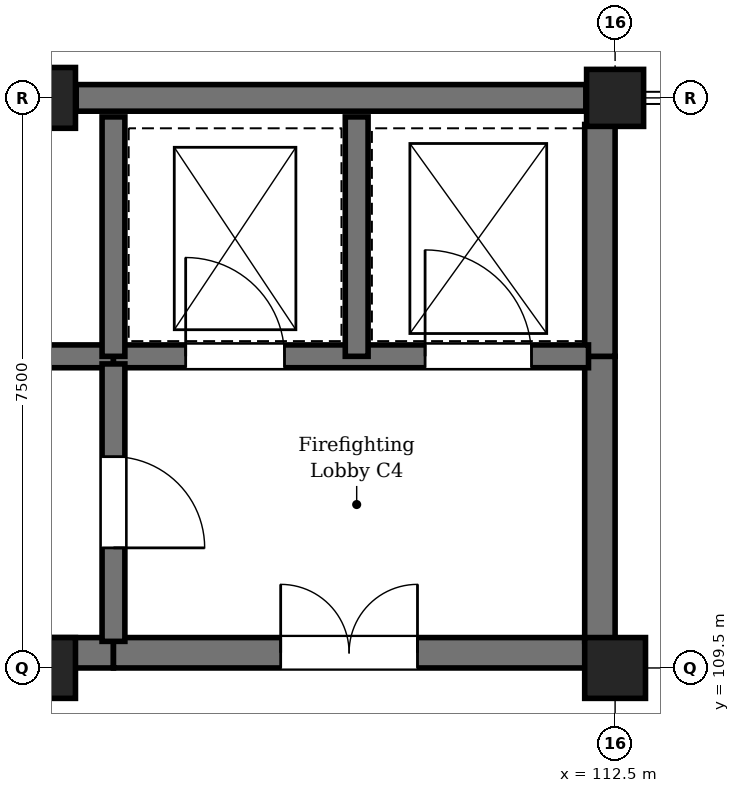
"""IFC4 building model, lengths in metres.
Left out: names, types, materials, properties, quantities, classifications, styles, units other than length and angle.
Written with IfcOpenShell. Run it as: python <this file> out.ifc"""

import sys

from ifc_helpers import new_model, si_unit, direction, frame, frame_2d, origin, origin_2d, place, context, subcontext, project, spatial, rectangle, circle, extrude, element, fill, save


model = new_model("IFC4")
c1 = context("Model", 3, precision=1e-05, world=origin(), true_north=direction((0.0, 1.0)))
c2 = subcontext(c1, "Body", "Model", "MODEL_VIEW")
j1 = project(units=[si_unit("LENGTHUNIT", "METRE"), si_unit("PLANEANGLEUNIT", "RADIAN")], contexts=[c1])
p1 = place(None, origin())
s1 = spatial("IfcSite", under=j1, at=p1, CompositionType="ELEMENT")
p2 = place(p1, origin())
s2 = spatial("IfcBuilding", under=s1, at=p2, CompositionType="ELEMENT")
p3 = place(p2, origin())
s3 = spatial("IfcBuildingStorey", under=s2, at=p3, CompositionType="ELEMENT", Elevation=0.0)
for number, where, z_axis, x_axis in (
    (1, (105.0, 109.5, 0.0), (0.0, 0.0, 1.0), (1.0, 0.0, 0.0)),
    (2, (105.0, 117.0, 0.0), (0.0, 0.0, 1.0), (1.0, 0.0, 0.0)),
    (3, (112.5, 109.5, 0.0), (0.0, 0.0, 1.0), (1.0, 0.0, 0.0)),
):
    element("IfcColumn", number, at=place(p3, frame(where, z_axis=z_axis, x_axis=x_axis)), inside=s3, PredefinedType="COLUMN", context=c2, shape_type="SweptSolid", body=[
        extrude(rectangle(XDim=0.8, YDim=0.8, at=origin_2d()), origin(), (0.0, 0.0, 1.0), 4.8),
    ])
p4 = place(p3, frame((112.5, 117.0, 0.0), z_axis=(0.0, 0.0, 1.0), x_axis=(1.0, 0.0, 0.0)))
e4 = element("IfcColumn", 4, at=p4, inside=s3, PredefinedType="COLUMN", context=c2, shape_type="SweptSolid", body=[
    extrude(circle(Radius=0.375, at=origin_2d()), origin(), (0.0, 0.0, 1.0), 4.8),
])
p5 = place(p3, frame((105.41, 117.0, 0.0), z_axis=(0.0, 0.0, 1.0), x_axis=(1.0, 0.0, 0.0)))
e5 = element("IfcWall", 5, at=p5, inside=s3, PredefinedType="SHEAR", context=c2, shape_type="SweptSolid", body=[
    extrude(rectangle(XDim=6.705, YDim=0.35, at=frame_2d((3.353, 0.0))), origin(), (0.0, 0.0, 1.0), 4.5),
])
p6 = place(p3, frame((97.85, 109.7, 0.0), z_axis=(0.0, 0.0, 1.0), x_axis=(1.0, 0.0, 0.0)))
e6 = element("IfcWall", 6, at=p6, inside=s3, PredefinedType="SHEAR", context=c2, shape_type="SweptSolid", body=[
    extrude(rectangle(XDim=8.05, YDim=0.4, at=frame_2d((4.025, 0.0))), origin(), (0.0, 0.0, 1.0), 4.5),
])
p7 = place(p3, frame((105.9, 109.7, 0.0), z_axis=(0.0, 0.0, 1.0), x_axis=(1.0, 0.0, 0.0)))
e7 = element("IfcWall", 7, at=p7, inside=s3, PredefinedType="SHEAR", context=c2, shape_type="SweptSolid", body=[
    extrude(rectangle(XDim=6.25, YDim=0.4, at=frame_2d((3.125, 0.0))), origin(), (0.0, 0.0, 1.0), 4.5),
])
p8 = place(p7, frame((2.2, 0.0, 0.0)))
e8 = element("IfcOpeningElement", 8, at=p8, cuts=e7, PredefinedType="OPENING", context=c2, shape_type="SweptSolid", body=[
    extrude(rectangle(XDim=1.8, YDim=2.25, at=frame_2d((0.9, 1.125))), frame((0.0, 0.21, 0.0), z_axis=(0.0, -1.0, 0.0), x_axis=(1.0, 0.0, 0.0)), (0.0, 0.0, 1.0), 0.42),
])
p9 = place(p3, frame((112.3, 109.85, 0.0), z_axis=(0.0, 0.0, 1.0), x_axis=(0.0, 1.0, 0.0)))
e9 = element("IfcWall", 9, at=p9, inside=s3, PredefinedType="SHEAR", context=c2, shape_type="SweptSolid", body=[
    extrude(rectangle(XDim=3.75, YDim=0.4, at=frame_2d((1.875, 0.0))), origin(), (0.0, 0.0, 1.0), 4.5),
])
p10 = place(p3, frame((112.3, 113.6, 0.0), z_axis=(0.0, 0.0, 1.0), x_axis=(0.0, 1.0, 0.0)))
e10 = element("IfcWall", 10, at=p10, inside=s3, PredefinedType="SHEAR", context=c2, shape_type="SweptSolid", body=[
    extrude(rectangle(XDim=3.05, YDim=0.4, at=frame_2d((1.525, 0.0))), origin(), (0.0, 0.0, 1.0), 4.5),
])
p11 = place(p3, frame((97.85, 113.6, 0.0), z_axis=(0.0, 0.0, 1.0), x_axis=(1.0, 0.0, 0.0)))
e11 = element("IfcWall", 11, at=p11, inside=s3, PredefinedType="SHEAR", context=c2, shape_type="SweptSolid", body=[
    extrude(rectangle(XDim=8.05, YDim=0.3, at=frame_2d((4.025, 0.0))), origin(), (0.0, 0.0, 1.0), 4.5),
])
p12 = place(p3, frame((105.9, 113.6, 0.0), z_axis=(0.0, 0.0, 1.0), x_axis=(1.0, 0.0, 0.0)))
e12 = element("IfcWall", 12, at=p12, inside=s3, PredefinedType="SHEAR", context=c2, shape_type="SweptSolid", body=[
    extrude(rectangle(XDim=6.25, YDim=0.3, at=frame_2d((3.125, 0.0))), origin(), (0.0, 0.0, 1.0), 4.5),
])
p13 = place(p12, frame((0.95, 0.0, 0.0)))
e13 = element("IfcOpeningElement", 13, at=p13, cuts=e12, PredefinedType="OPENING", context=c2, shape_type="SweptSolid", body=[
    extrude(rectangle(XDim=1.3, YDim=2.2, at=frame_2d((0.65, 1.1))), frame((0.0, 0.16, 0.0), z_axis=(0.0, -1.0, 0.0), x_axis=(1.0, 0.0, 0.0)), (0.0, 0.0, 1.0), 0.32),
])
p14 = place(p12, frame((4.1, 0.0, 0.0)))
e14 = element("IfcOpeningElement", 14, at=p14, cuts=e12, PredefinedType="OPENING", context=c2, shape_type="SweptSolid", body=[
    extrude(rectangle(XDim=1.4, YDim=2.25, at=frame_2d((0.7, 1.125))), frame((0.0, 0.16, 0.0), z_axis=(0.0, -1.0, 0.0), x_axis=(1.0, 0.0, 0.0)), (0.0, 0.0, 1.0), 0.32),
])
p15 = place(p3, frame((105.9, 113.5, 0.0), z_axis=(0.0, 0.0, 1.0), x_axis=(0.0, -1.0, 0.0)))
e15 = element("IfcWall", 15, at=p15, inside=s3, PredefinedType="SHEAR", context=c2, shape_type="SweptSolid", body=[
    extrude(rectangle(XDim=3.65, YDim=0.3, at=frame_2d((1.825, 0.0))), origin(), (0.0, 0.0, 1.0), 4.5),
])
p16 = place(p15, frame((1.22, 0.0, 0.0)))
e16 = element("IfcOpeningElement", 16, at=p16, cuts=e15, PredefinedType="OPENING", context=c2, shape_type="SweptSolid", body=[
    extrude(rectangle(XDim=1.2, YDim=2.25, at=frame_2d((0.6, 1.125))), frame((0.0, 0.16, 0.0), z_axis=(0.0, -1.0, 0.0), x_axis=(1.0, 0.0, 0.0)), (0.0, 0.0, 1.0), 0.32),
])
for number, where, z_axis, x_axis in (
    (17, (105.9, 113.6, 0.0), (0.0, 0.0, 1.0), (0.0, 1.0, 0.0)),
    (18, (109.1, 113.6, 0.0), (0.0, 0.0, 1.0), (0.0, 1.0, 0.0)),
):
    element("IfcWall", number, at=place(p3, frame(where, z_axis=z_axis, x_axis=x_axis)), inside=s3, PredefinedType="SHEAR", context=c2, shape_type="SweptSolid", body=[
        extrude(rectangle(XDim=3.15, YDim=0.3, at=frame_2d((1.575, 0.0))), origin(), (0.0, 0.0, 1.0), 4.5),
    ])
p17 = place(p8, origin())
e19 = element("IfcDoor", 19, at=p17, inside=s3, OperationType="DOUBLE_DOOR_SINGLE_SWING", PredefinedType="DOOR", context=c2, shape_type="SweptSolid", body=[
    extrude(rectangle(XDim=1.8, YDim=2.25, at=frame_2d((0.9, 1.125))), frame((0.0, 0.025, 0.0), z_axis=(0.0, -1.0, 0.0), x_axis=(1.0, 0.0, 0.0)), (0.0, 0.0, 1.0), 0.05),
])
fill(e8, e19)
p18 = place(p13, origin())
e20 = element("IfcDoor", 20, at=p18, inside=s3, OperationType="DOUBLE_DOOR_SLIDING", PredefinedType="DOOR", context=c2, shape_type="SweptSolid", body=[
    extrude(rectangle(XDim=1.3, YDim=2.2, at=frame_2d((0.65, 1.1))), frame((0.0, 0.025, 0.0), z_axis=(0.0, -1.0, 0.0), x_axis=(1.0, 0.0, 0.0)), (0.0, 0.0, 1.0), 0.05),
])
fill(e13, e20)
p19 = place(p14, origin())
e21 = element("IfcDoor", 21, at=p19, inside=s3, OperationType="DOUBLE_DOOR_SLIDING", PredefinedType="DOOR", context=c2, shape_type="SweptSolid", body=[
    extrude(rectangle(XDim=1.4, YDim=2.25, at=frame_2d((0.7, 1.125))), frame((0.0, 0.025, 0.0), z_axis=(0.0, -1.0, 0.0), x_axis=(1.0, 0.0, 0.0)), (0.0, 0.0, 1.0), 0.05),
])
fill(e14, e21)
p20 = place(p16, origin())
e22 = element("IfcDoor", 22, at=p20, inside=s3, OperationType="SINGLE_SWING_RIGHT", PredefinedType="DOOR", context=c2, shape_type="SweptSolid", body=[
    extrude(rectangle(XDim=1.2, YDim=2.25, at=frame_2d((0.6, 1.125))), frame((0.0, 0.025, 0.0), z_axis=(0.0, -1.0, 0.0), x_axis=(1.0, 0.0, 0.0)), (0.0, 0.0, 1.0), 0.05),
])
fill(e16, e22)
save(model, sys.argv[1])
